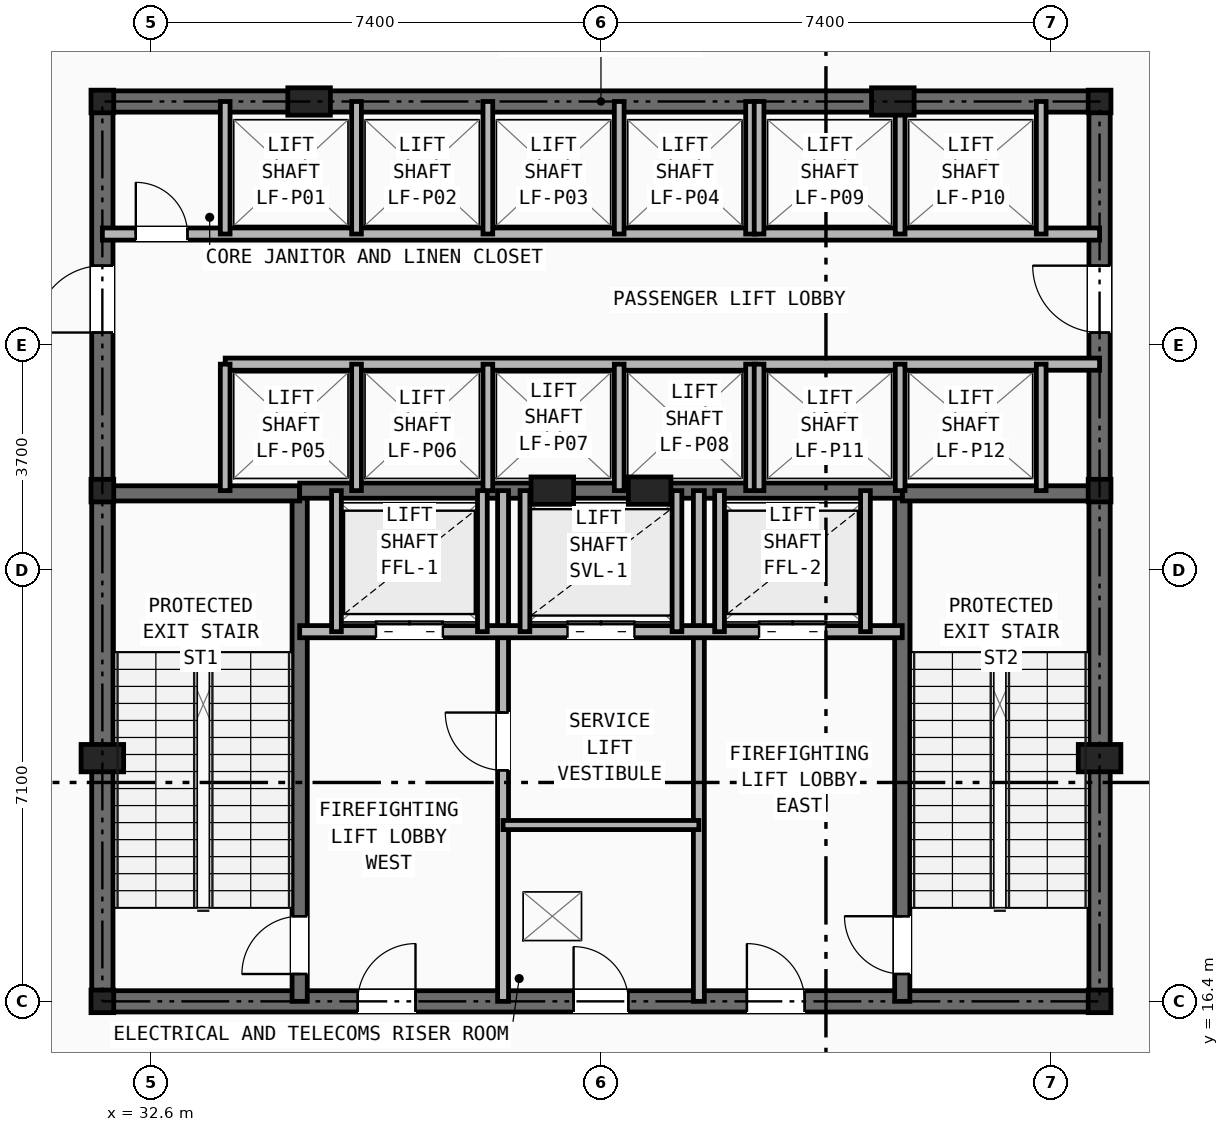
"""IFC4 building model, lengths in metres.
Left out: names, types, materials, properties, quantities, classifications, styles, units other than length and angle.
Written with IfcOpenShell. Run it as: python <this file> out.ifc"""

import sys

from ifc_helpers import new_model, si_unit, direction, frame, frame_2d, origin, origin_2d, place, context, subcontext, project, spatial, rectangle, i_section, extrude, element, fill, save


model = new_model("IFC4")
c1 = context("Model", 3, precision=1e-05, world=origin(), true_north=direction((0.0, 1.0)))
c2 = subcontext(c1, "Body", "Model", "MODEL_VIEW")
j1 = project(units=[si_unit("LENGTHUNIT", "METRE"), si_unit("PLANEANGLEUNIT", "RADIAN")], contexts=[c1])
p1 = place(None, origin())
s1 = spatial("IfcSite", under=j1, at=p1, CompositionType="ELEMENT")
p2 = place(p1, origin())
s2 = spatial("IfcBuilding", under=s1, at=p2, CompositionType="ELEMENT")
p3 = place(p2, frame((0.0, 0.0, 16.5)))
s3 = spatial("IfcBuildingStorey", under=s2, at=p3, CompositionType="ELEMENT", Elevation=16.5)
for number, where, z_axis, x_axis in (
    (1, (31.8, 16.4, 0.0), (0.0, 0.0, 1.0), (1.0, 0.0, 0.0)),
    (2, (48.2, 16.4, 0.0), (0.0, 0.0, 1.0), (1.0, 0.0, 0.0)),
    (3, (31.8, 24.8, 0.0), (0.0, 0.0, 1.0), (1.0, 0.0, 0.0)),
    (4, (48.2, 24.8, 0.0), (0.0, 0.0, 1.0), (1.0, 0.0, 0.0)),
    (5, (31.8, 31.2, 0.0), (0.0, 0.0, 1.0), (1.0, 0.0, 0.0)),
    (6, (48.2, 31.2, 0.0), (0.0, 0.0, 1.0), (1.0, 0.0, 0.0)),
):
    element("IfcColumn", number, at=place(p3, frame(where, z_axis=z_axis, x_axis=x_axis)), inside=s3, PredefinedType="COLUMN", context=c2, shape_type="SweptSolid", body=[
        extrude(i_section(OverallWidth=0.374, OverallDepth=0.372, WebThickness=0.016, FlangeThickness=0.026, at=origin_2d()), origin(), (0.0, 0.0, 1.0), 5.5),
    ])
for number, where, z_axis, x_axis in (
    (7, (31.8, 20.4, 0.0), (0.0, 0.0, 1.0), (1.0, 0.0, 0.0)),
    (8, (48.2, 20.4, 0.0), (0.0, 0.0, 1.0), (1.0, 0.0, 0.0)),
    (9, (35.2, 31.2, 0.0), (0.0, 0.0, 1.0), (1.0, 0.0, 0.0)),
    (10, (44.8, 31.2, 0.0), (0.0, 0.0, 1.0), (1.0, 0.0, 0.0)),
    (11, (39.2, 24.8, 0.0), (0.0, 0.0, 1.0), (1.0, 0.0, 0.0)),
    (12, (40.8, 24.8, 0.0), (0.0, 0.0, 1.0), (1.0, 0.0, 0.0)),
):
    element("IfcColumn", number, at=place(p3, frame(where, z_axis=z_axis, x_axis=x_axis)), inside=s3, PredefinedType="PILASTER", context=c2, shape_type="SweptSolid", body=[
        extrude(rectangle(XDim=0.7, YDim=0.45, at=origin_2d()), origin(), (0.0, 0.0, 1.0), 5.5),
    ])
p4 = place(p3, frame((31.8, 16.4, 0.0), z_axis=(0.0, 0.0, 1.0), x_axis=(1.0, 0.0, 0.0)))
e13 = element("IfcWall", 13, at=p4, inside=s3, PredefinedType="SHEAR", context=c2, shape_type="SweptSolid", body=[
    extrude(rectangle(XDim=16.4, YDim=0.35, at=frame_2d((8.2, 0.0))), origin(), (0.0, 0.0, 1.0), 5.18),
])
p5 = place(p4, frame((7.75, 0.0, 0.0)))
e14 = element("IfcOpeningElement", 14, at=p5, cuts=e13, PredefinedType="OPENING", context=c2, shape_type="SweptSolid", body=[
    extrude(rectangle(XDim=0.9, YDim=2.1, at=frame_2d((0.45, 1.05))), frame((0.0, 0.185, 0.0), z_axis=(0.0, -1.0, 0.0), x_axis=(1.0, 0.0, 0.0)), (0.0, 0.0, 1.0), 0.37),
])
p6 = place(p4, frame((4.2, 0.0, 0.0)))
e15 = element("IfcOpeningElement", 15, at=p6, cuts=e13, PredefinedType="OPENING", context=c2, shape_type="SweptSolid", body=[
    extrude(rectangle(XDim=0.95, YDim=2.1, at=frame_2d((0.475, 1.05))), frame((0.0, 0.185, 0.0), z_axis=(0.0, -1.0, 0.0), x_axis=(1.0, 0.0, 0.0)), (0.0, 0.0, 1.0), 0.37),
])
p7 = place(p4, frame((10.6, 0.0, 0.0)))
e16 = element("IfcOpeningElement", 16, at=p7, cuts=e13, PredefinedType="OPENING", context=c2, shape_type="SweptSolid", body=[
    extrude(rectangle(XDim=0.95, YDim=2.1, at=frame_2d((0.475, 1.05))), frame((0.0, 0.185, 0.0), z_axis=(0.0, -1.0, 0.0), x_axis=(1.0, 0.0, 0.0)), (0.0, 0.0, 1.0), 0.37),
])
p8 = place(p3, frame((31.8, 31.2, 0.0), z_axis=(0.0, 0.0, 1.0), x_axis=(1.0, 0.0, 0.0)))
e17 = element("IfcWall", 17, at=p8, inside=s3, PredefinedType="SHEAR", context=c2, shape_type="SweptSolid", body=[
    extrude(rectangle(XDim=16.4, YDim=0.35, at=frame_2d((8.2, 0.0))), origin(), (0.0, 0.0, 1.0), 5.18),
])
p9 = place(p3, frame((31.8, 16.4, 0.0), z_axis=(0.0, 0.0, 1.0), x_axis=(0.0, 1.0, 0.0)))
e18 = element("IfcWall", 18, at=p9, inside=s3, PredefinedType="SHEAR", context=c2, shape_type="SweptSolid", body=[
    extrude(rectangle(XDim=14.8, YDim=0.35, at=frame_2d((7.4, 0.0))), origin(), (0.0, 0.0, 1.0), 5.18),
])
p10 = place(p9, frame((11.0, 0.0, 0.0)))
e19 = element("IfcOpeningElement", 19, at=p10, cuts=e18, PredefinedType="OPENING", context=c2, shape_type="SweptSolid", body=[
    extrude(rectangle(XDim=1.1, YDim=2.15, at=frame_2d((0.55, 1.075))), frame((0.0, 0.185, 0.0), z_axis=(0.0, -1.0, 0.0), x_axis=(1.0, 0.0, 0.0)), (0.0, 0.0, 1.0), 0.37),
])
p11 = place(p3, frame((48.2, 16.4, 0.0), z_axis=(0.0, 0.0, 1.0), x_axis=(0.0, 1.0, 0.0)))
e20 = element("IfcWall", 20, at=p11, inside=s3, PredefinedType="SHEAR", context=c2, shape_type="SweptSolid", body=[
    extrude(rectangle(XDim=14.8, YDim=0.35, at=frame_2d((7.4, 0.0))), origin(), (0.0, 0.0, 1.0), 5.18),
])
p12 = place(p11, frame((11.0, 0.0, 0.0)))
e21 = element("IfcOpeningElement", 21, at=p12, cuts=e20, PredefinedType="OPENING", context=c2, shape_type="SweptSolid", body=[
    extrude(rectangle(XDim=1.1, YDim=2.15, at=frame_2d((0.55, 1.075))), frame((0.0, 0.185, 0.0), z_axis=(0.0, -1.0, 0.0), x_axis=(1.0, 0.0, 0.0)), (0.0, 0.0, 1.0), 0.37),
])
p13 = place(p3, frame((35.045, 16.4, 0.0), z_axis=(0.0, 0.0, 1.0), x_axis=(0.0, 1.0, 0.0)))
e22 = element("IfcWall", 22, at=p13, inside=s3, PredefinedType="SHEAR", context=c2, shape_type="SweptSolid", body=[
    extrude(rectangle(XDim=8.4, YDim=0.25, at=frame_2d((4.2, 0.0))), origin(), (0.0, 0.0, 1.0), 5.18),
])
p14 = place(p13, frame((0.45, 0.0, 0.0)))
e23 = element("IfcOpeningElement", 23, at=p14, cuts=e22, PredefinedType="OPENING", context=c2, shape_type="SweptSolid", body=[
    extrude(rectangle(XDim=0.95, YDim=2.1, at=frame_2d((0.475, 1.05))), frame((0.0, 0.135, 0.0), z_axis=(0.0, -1.0, 0.0), x_axis=(1.0, 0.0, 0.0)), (0.0, 0.0, 1.0), 0.27),
])
p15 = place(p3, frame((31.8, 24.755, 0.0), z_axis=(0.0, 0.0, 1.0), x_axis=(1.0, 0.0, 0.0)))
e24 = element("IfcWall", 24, at=p15, inside=s3, PredefinedType="SHEAR", context=c2, shape_type="SweptSolid", body=[
    extrude(rectangle(XDim=3.245, YDim=0.25, at=frame_2d((1.623, 0.0))), origin(), (0.0, 0.0, 1.0), 5.18),
])
p16 = place(p3, frame((44.955, 16.4, 0.0), z_axis=(0.0, 0.0, 1.0), x_axis=(0.0, 1.0, 0.0)))
e25 = element("IfcWall", 25, at=p16, inside=s3, PredefinedType="SHEAR", context=c2, shape_type="SweptSolid", body=[
    extrude(rectangle(XDim=8.4, YDim=0.25, at=frame_2d((4.2, 0.0))), origin(), (0.0, 0.0, 1.0), 5.18),
])
p17 = place(p16, frame((0.45, 0.0, 0.0)))
e26 = element("IfcOpeningElement", 26, at=p17, cuts=e25, PredefinedType="OPENING", context=c2, shape_type="SweptSolid", body=[
    extrude(rectangle(XDim=0.95, YDim=2.1, at=frame_2d((0.475, 1.05))), frame((0.0, 0.135, 0.0), z_axis=(0.0, -1.0, 0.0), x_axis=(1.0, 0.0, 0.0)), (0.0, 0.0, 1.0), 0.27),
])
p18 = place(p3, frame((44.955, 24.755, 0.0), z_axis=(0.0, 0.0, 1.0), x_axis=(1.0, 0.0, 0.0)))
e27 = element("IfcWall", 27, at=p18, inside=s3, PredefinedType="SHEAR", context=c2, shape_type="SweptSolid", body=[
    extrude(rectangle(XDim=3.245, YDim=0.25, at=frame_2d((1.623, 0.0))), origin(), (0.0, 0.0, 1.0), 5.18),
])
p19 = place(p3, frame((35.045, 24.8, 0.0), z_axis=(0.0, 0.0, 1.0), x_axis=(1.0, 0.0, 0.0)))
e28 = element("IfcWall", 28, at=p19, inside=s3, PredefinedType="SHEAR", context=c2, shape_type="SweptSolid", body=[
    extrude(rectangle(XDim=9.91, YDim=0.25, at=frame_2d((4.955, 0.0))), origin(), (0.0, 0.0, 1.0), 5.18),
])
p20 = place(p3, frame((38.39, 16.4, 0.0), z_axis=(0.0, 0.0, 1.0), x_axis=(0.0, 1.0, 0.0)))
e29 = element("IfcWall", 29, at=p20, inside=s3, PredefinedType="PARTITIONING", context=c2, shape_type="SweptSolid", body=[
    extrude(rectangle(XDim=8.4, YDim=0.18, at=frame_2d((4.2, 0.0))), origin(), (0.0, 0.0, 1.0), 4.631),
])
p21 = place(p20, frame((3.8, 0.0, 0.0)))
e30 = element("IfcOpeningElement", 30, at=p21, cuts=e29, PredefinedType="OPENING", context=c2, shape_type="SweptSolid", body=[
    extrude(rectangle(XDim=0.95, YDim=2.1, at=frame_2d((0.475, 1.05))), frame((0.0, 0.1, 0.0), z_axis=(0.0, -1.0, 0.0), x_axis=(1.0, 0.0, 0.0)), (0.0, 0.0, 1.0), 0.2),
])
p22 = place(p3, frame((41.61, 16.4, 0.0), z_axis=(0.0, 0.0, 1.0), x_axis=(0.0, 1.0, 0.0)))
e31 = element("IfcWall", 31, at=p22, inside=s3, PredefinedType="PARTITIONING", context=c2, shape_type="SweptSolid", body=[
    extrude(rectangle(XDim=8.4, YDim=0.18, at=frame_2d((4.2, 0.0))), origin(), (0.0, 0.0, 1.0), 4.631),
])
p23 = place(p3, frame((35.045, 22.48, 0.0), z_axis=(0.0, 0.0, 1.0), x_axis=(1.0, 0.0, 0.0)))
e32 = element("IfcWall", 32, at=p23, inside=s3, PredefinedType="SOLIDWALL", context=c2, shape_type="SweptSolid", body=[
    extrude(rectangle(XDim=9.91, YDim=0.2, at=frame_2d((4.955, 0.0))), origin(), (0.0, 0.0, 1.0), 5.18),
])
p24 = place(p23, frame((1.255, 0.0, 0.0)))
e33 = element("IfcOpeningElement", 33, at=p24, cuts=e32, PredefinedType="OPENING", context=c2, shape_type="SweptSolid", body=[
    extrude(rectangle(XDim=1.1, YDim=2.15, at=frame_2d((0.55, 1.075))), frame((0.0, 0.11, 0.0), z_axis=(0.0, -1.0, 0.0), x_axis=(1.0, 0.0, 0.0)), (0.0, 0.0, 1.0), 0.22),
])
p25 = place(p23, frame((7.555, 0.0, 0.0)))
e34 = element("IfcOpeningElement", 34, at=p25, cuts=e32, PredefinedType="OPENING", context=c2, shape_type="SweptSolid", body=[
    extrude(rectangle(XDim=1.1, YDim=2.15, at=frame_2d((0.55, 1.075))), frame((0.0, 0.11, 0.0), z_axis=(0.0, -1.0, 0.0), x_axis=(1.0, 0.0, 0.0)), (0.0, 0.0, 1.0), 0.22),
])
p26 = place(p23, frame((4.405, 0.0, 0.0)))
e35 = element("IfcOpeningElement", 35, at=p26, cuts=e32, PredefinedType="OPENING", context=c2, shape_type="SweptSolid", body=[
    extrude(rectangle(XDim=1.1, YDim=2.15, at=frame_2d((0.55, 1.075))), frame((0.0, 0.11, 0.0), z_axis=(0.0, -1.0, 0.0), x_axis=(1.0, 0.0, 0.0)), (0.0, 0.0, 1.0), 0.22),
])
p27 = place(p3, frame((38.39, 19.3, 0.0), z_axis=(0.0, 0.0, 1.0), x_axis=(1.0, 0.0, 0.0)))
e36 = element("IfcWall", 36, at=p27, inside=s3, PredefinedType="PARTITIONING", context=c2, shape_type="SweptSolid", body=[
    extrude(rectangle(XDim=3.22, YDim=0.15, at=frame_2d((1.61, 0.0))), origin(), (0.0, 0.0, 1.0), 5.18),
])
for number, where, z_axis, x_axis in (
    (37, (35.65, 22.48, 0.0), (0.0, 0.0, 1.0), (0.0, 1.0, 0.0)),
    (38, (38.05, 22.48, 0.0), (0.0, 0.0, 1.0), (0.0, 1.0, 0.0)),
    (39, (41.95, 22.48, 0.0), (0.0, 0.0, 1.0), (0.0, 1.0, 0.0)),
    (40, (44.35, 22.48, 0.0), (0.0, 0.0, 1.0), (0.0, 1.0, 0.0)),
    (41, (38.75, 22.48, 0.0), (0.0, 0.0, 1.0), (0.0, 1.0, 0.0)),
    (42, (41.25, 22.48, 0.0), (0.0, 0.0, 1.0), (0.0, 1.0, 0.0)),
):
    element("IfcWall", number, at=place(p3, frame(where, z_axis=z_axis, x_axis=x_axis)), inside=s3, PredefinedType="SOLIDWALL", context=c2, shape_type="SweptSolid", body=[
        extrude(rectangle(XDim=2.32, YDim=0.16, at=frame_2d((1.16, 0.0))), origin(), (0.0, 0.0, 1.0), 5.18),
    ])
p28 = place(p3, frame((31.8, 29.02, 0.0), z_axis=(0.0, 0.0, 1.0), x_axis=(1.0, 0.0, 0.0)))
e43 = element("IfcWall", 43, at=p28, inside=s3, PredefinedType="SOLIDWALL", context=c2, shape_type="SweptSolid", body=[
    extrude(rectangle(XDim=16.4, YDim=0.2, at=frame_2d((8.2, 0.0))), origin(), (0.0, 0.0, 1.0), 4.631),
])
p29 = place(p28, frame((0.55, 0.0, 0.0)))
e44 = element("IfcOpeningElement", 44, at=p29, cuts=e43, PredefinedType="OPENING", context=c2, shape_type="SweptSolid", body=[
    extrude(rectangle(XDim=0.85, YDim=2.05, at=frame_2d((0.425, 1.025))), frame((0.0, 0.11, 0.0), z_axis=(0.0, -1.0, 0.0), x_axis=(1.0, 0.0, 0.0)), (0.0, 0.0, 1.0), 0.22),
])
p30 = place(p3, frame((33.82, 26.88, 0.0), z_axis=(0.0, 0.0, 1.0), x_axis=(1.0, 0.0, 0.0)))
e45 = element("IfcWall", 45, at=p30, inside=s3, PredefinedType="SOLIDWALL", context=c2, shape_type="SweptSolid", body=[
    extrude(rectangle(XDim=14.38, YDim=0.2, at=frame_2d((7.19, 0.0))), origin(), (0.0, 0.0, 1.0), 4.631),
])
p31 = place(p3, frame((33.82, 29.02, 0.0), z_axis=(0.0, 0.0, 1.0), x_axis=(0.0, 1.0, 0.0)))
e46 = element("IfcWall", 46, at=p31, inside=s3, PredefinedType="SOLIDWALL", context=c2, shape_type="SweptSolid", body=[
    extrude(rectangle(XDim=2.18, YDim=0.16, at=frame_2d((1.09, 0.0))), origin(), (0.0, 0.0, 1.0), 4.631),
])
p32 = place(p3, frame((33.82, 24.8, 0.0), z_axis=(0.0, 0.0, 1.0), x_axis=(0.0, 1.0, 0.0)))
e47 = element("IfcWall", 47, at=p32, inside=s3, PredefinedType="SOLIDWALL", context=c2, shape_type="SweptSolid", body=[
    extrude(rectangle(XDim=2.08, YDim=0.16, at=frame_2d((1.04, 0.0))), origin(), (0.0, 0.0, 1.0), 5.18),
])
for number, where, z_axis, x_axis in (
    (48, (35.98, 29.02, 0.0), (0.0, 0.0, 1.0), (0.0, 1.0, 0.0)),
    (49, (38.14, 29.02, 0.0), (0.0, 0.0, 1.0), (0.0, 1.0, 0.0)),
    (50, (40.3, 29.02, 0.0), (0.0, 0.0, 1.0), (0.0, 1.0, 0.0)),
    (51, (42.46, 29.02, 0.0), (0.0, 0.0, 1.0), (0.0, 1.0, 0.0)),
):
    element("IfcWall", number, at=place(p3, frame(where, z_axis=z_axis, x_axis=x_axis)), inside=s3, PredefinedType="SOLIDWALL", context=c2, shape_type="SweptSolid", body=[
        extrude(rectangle(XDim=2.18, YDim=0.16, at=frame_2d((1.09, 0.0))), origin(), (0.0, 0.0, 1.0), 4.631),
    ])
for number, where, z_axis, x_axis in (
    (52, (35.98, 24.8, 0.0), (0.0, 0.0, 1.0), (0.0, 1.0, 0.0)),
    (53, (38.14, 24.8, 0.0), (0.0, 0.0, 1.0), (0.0, 1.0, 0.0)),
    (54, (40.3, 24.8, 0.0), (0.0, 0.0, 1.0), (0.0, 1.0, 0.0)),
    (55, (42.46, 24.8, 0.0), (0.0, 0.0, 1.0), (0.0, 1.0, 0.0)),
):
    element("IfcWall", number, at=place(p3, frame(where, z_axis=z_axis, x_axis=x_axis)), inside=s3, PredefinedType="SOLIDWALL", context=c2, shape_type="SweptSolid", body=[
        extrude(rectangle(XDim=2.08, YDim=0.16, at=frame_2d((1.04, 0.0))), origin(), (0.0, 0.0, 1.0), 5.18),
    ])
for number, where, z_axis, x_axis in (
    (56, (42.6, 29.02, 0.0), (0.0, 0.0, 1.0), (0.0, 1.0, 0.0)),
    (57, (44.92, 29.02, 0.0), (0.0, 0.0, 1.0), (0.0, 1.0, 0.0)),
    (58, (47.24, 29.02, 0.0), (0.0, 0.0, 1.0), (0.0, 1.0, 0.0)),
):
    element("IfcWall", number, at=place(p3, frame(where, z_axis=z_axis, x_axis=x_axis)), inside=s3, PredefinedType="SOLIDWALL", context=c2, shape_type="SweptSolid", body=[
        extrude(rectangle(XDim=2.18, YDim=0.16, at=frame_2d((1.09, 0.0))), origin(), (0.0, 0.0, 1.0), 4.631),
    ])
for number, where, z_axis, x_axis in (
    (59, (42.6, 24.8, 0.0), (0.0, 0.0, 1.0), (0.0, 1.0, 0.0)),
    (60, (44.92, 24.8, 0.0), (0.0, 0.0, 1.0), (0.0, 1.0, 0.0)),
    (61, (47.24, 24.8, 0.0), (0.0, 0.0, 1.0), (0.0, 1.0, 0.0)),
):
    element("IfcWall", number, at=place(p3, frame(where, z_axis=z_axis, x_axis=x_axis)), inside=s3, PredefinedType="SOLIDWALL", context=c2, shape_type="SweptSolid", body=[
        extrude(rectangle(XDim=2.08, YDim=0.16, at=frame_2d((1.04, 0.0))), origin(), (0.0, 0.0, 1.0), 5.18),
    ])
p33 = place(p5, origin())
e62 = element("IfcDoor", 62, at=p33, inside=s3, OperationType="SINGLE_SWING_LEFT", PredefinedType="DOOR", context=c2, shape_type="SweptSolid", body=[
    extrude(rectangle(XDim=0.9, YDim=2.1, at=frame_2d((0.45, 1.05))), frame((0.0, 0.025, 0.0), z_axis=(0.0, -1.0, 0.0), x_axis=(1.0, 0.0, 0.0)), (0.0, 0.0, 1.0), 0.05),
])
fill(e14, e62)
p34 = place(p21, origin())
e63 = element("IfcDoor", 63, at=p34, inside=s3, OperationType="SINGLE_SWING_RIGHT", PredefinedType="DOOR", context=c2, shape_type="SweptSolid", body=[
    extrude(rectangle(XDim=0.95, YDim=2.1, at=frame_2d((0.475, 1.05))), frame((0.0, 0.025, 0.0), z_axis=(0.0, -1.0, 0.0), x_axis=(1.0, 0.0, 0.0)), (0.0, 0.0, 1.0), 0.05),
])
fill(e30, e63)
p35 = place(p14, origin())
e64 = element("IfcDoor", 64, at=p35, inside=s3, OperationType="SINGLE_SWING_LEFT", PredefinedType="DOOR", context=c2, shape_type="SweptSolid", body=[
    extrude(rectangle(XDim=0.95, YDim=2.1, at=frame_2d((0.475, 1.05))), frame((0.0, 0.025, 0.0), z_axis=(0.0, -1.0, 0.0), x_axis=(1.0, 0.0, 0.0)), (0.0, 0.0, 1.0), 0.05),
])
fill(e23, e64)
p36 = place(p17, origin())
e65 = element("IfcDoor", 65, at=p36, inside=s3, OperationType="SINGLE_SWING_RIGHT", PredefinedType="DOOR", context=c2, shape_type="SweptSolid", body=[
    extrude(rectangle(XDim=0.95, YDim=2.1, at=frame_2d((0.475, 1.05))), frame((0.0, 0.025, 0.0), z_axis=(0.0, -1.0, 0.0), x_axis=(1.0, 0.0, 0.0)), (0.0, 0.0, 1.0), 0.05),
])
fill(e26, e65)
p37 = place(p6, origin())
e66 = element("IfcDoor", 66, at=p37, inside=s3, OperationType="SINGLE_SWING_RIGHT", PredefinedType="DOOR", context=c2, shape_type="SweptSolid", body=[
    extrude(rectangle(XDim=0.95, YDim=2.1, at=frame_2d((0.475, 1.05))), frame((0.0, 0.025, 0.0), z_axis=(0.0, -1.0, 0.0), x_axis=(1.0, 0.0, 0.0)), (0.0, 0.0, 1.0), 0.05),
])
fill(e15, e66)
p38 = place(p7, origin())
e67 = element("IfcDoor", 67, at=p38, inside=s3, OperationType="SINGLE_SWING_LEFT", PredefinedType="DOOR", context=c2, shape_type="SweptSolid", body=[
    extrude(rectangle(XDim=0.95, YDim=2.1, at=frame_2d((0.475, 1.05))), frame((0.0, 0.025, 0.0), z_axis=(0.0, -1.0, 0.0), x_axis=(1.0, 0.0, 0.0)), (0.0, 0.0, 1.0), 0.05),
])
fill(e16, e67)
p39 = place(p24, origin())
e68 = element("IfcDoor", 68, at=p39, inside=s3, OperationType="DOUBLE_DOOR_SLIDING", PredefinedType="DOOR", context=c2, shape_type="SweptSolid", body=[
    extrude(rectangle(XDim=1.1, YDim=2.15, at=frame_2d((0.55, 1.075))), frame((0.0, 0.025, 0.0), z_axis=(0.0, -1.0, 0.0), x_axis=(1.0, 0.0, 0.0)), (0.0, 0.0, 1.0), 0.05),
])
fill(e33, e68)
p40 = place(p25, origin())
e69 = element("IfcDoor", 69, at=p40, inside=s3, OperationType="DOUBLE_DOOR_SLIDING", PredefinedType="DOOR", context=c2, shape_type="SweptSolid", body=[
    extrude(rectangle(XDim=1.1, YDim=2.15, at=frame_2d((0.55, 1.075))), frame((0.0, 0.025, 0.0), z_axis=(0.0, -1.0, 0.0), x_axis=(1.0, 0.0, 0.0)), (0.0, 0.0, 1.0), 0.05),
])
fill(e34, e69)
p41 = place(p26, origin())
e70 = element("IfcDoor", 70, at=p41, inside=s3, OperationType="DOUBLE_DOOR_SLIDING", PredefinedType="DOOR", context=c2, shape_type="SweptSolid", body=[
    extrude(rectangle(XDim=1.1, YDim=2.15, at=frame_2d((0.55, 1.075))), frame((0.0, 0.025, 0.0), z_axis=(0.0, -1.0, 0.0), x_axis=(1.0, 0.0, 0.0)), (0.0, 0.0, 1.0), 0.05),
])
fill(e35, e70)
p42 = place(p29, origin())
e71 = element("IfcDoor", 71, at=p42, inside=s3, OperationType="SINGLE_SWING_LEFT", PredefinedType="DOOR", context=c2, shape_type="SweptSolid", body=[
    extrude(rectangle(XDim=0.85, YDim=2.05, at=frame_2d((0.425, 1.025))), frame((0.0, 0.025, 0.0), z_axis=(0.0, -1.0, 0.0), x_axis=(1.0, 0.0, 0.0)), (0.0, 0.0, 1.0), 0.05),
])
fill(e44, e71)
p43 = place(p10, origin())
e72 = element("IfcDoor", 72, at=p43, inside=s3, OperationType="SINGLE_SWING_LEFT", PredefinedType="DOOR", context=c2, shape_type="SweptSolid", body=[
    extrude(rectangle(XDim=1.1, YDim=2.15, at=frame_2d((0.55, 1.075))), frame((0.0, 0.025, 0.0), z_axis=(0.0, -1.0, 0.0), x_axis=(1.0, 0.0, 0.0)), (0.0, 0.0, 1.0), 0.05),
])
fill(e19, e72)
p44 = place(p12, origin())
e73 = element("IfcDoor", 73, at=p44, inside=s3, OperationType="SINGLE_SWING_RIGHT", PredefinedType="DOOR", context=c2, shape_type="SweptSolid", body=[
    extrude(rectangle(XDim=1.1, YDim=2.15, at=frame_2d((0.55, 1.075))), frame((0.0, 0.025, 0.0), z_axis=(0.0, -1.0, 0.0), x_axis=(1.0, 0.0, 0.0)), (0.0, 0.0, 1.0), 0.05),
])
fill(e21, e73)
save(model, sys.argv[1])
